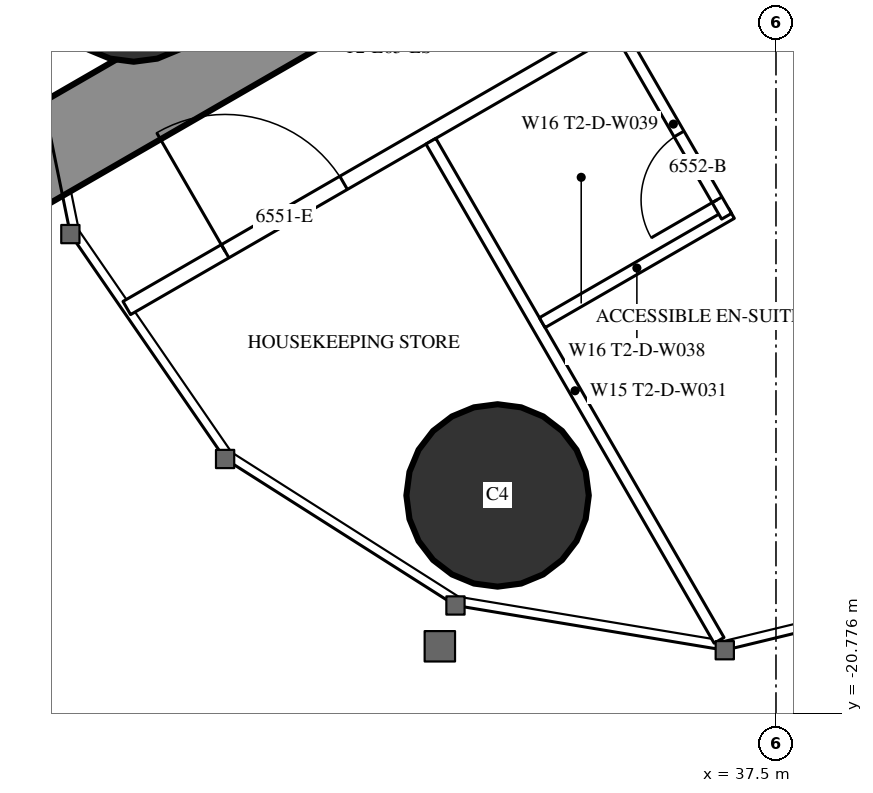
"""IFC4 building model, lengths in metres.
Left out: names, types, materials, properties, quantities, classifications, styles, units other than length and angle.
Written with IfcOpenShell. Run it as: python <this file> out.ifc"""

import sys

from ifc_helpers import new_model, si_unit, direction, frame, frame_2d, origin, origin_2d, place, context, subcontext, project, spatial, rectangle, circle, extrude, element, fill, save


model = new_model("IFC4")
c1 = context("Model", 3, precision=1e-05, world=origin(), true_north=direction((0.0, 1.0)))
c2 = subcontext(c1, "Body", "Model", "MODEL_VIEW")
j1 = project(units=[si_unit("LENGTHUNIT", "METRE"), si_unit("PLANEANGLEUNIT", "RADIAN")], contexts=[c1])
p1 = place(None, origin())
s1 = spatial("IfcSite", under=j1, at=p1, CompositionType="ELEMENT")
p2 = place(p1, origin())
s2 = spatial("IfcBuilding", under=s1, at=p2, CompositionType="ELEMENT")
p3 = place(p2, frame((0.0, 0.0, 244.1)))
s3 = spatial("IfcBuildingStorey", under=s2, at=p3, CompositionType="ELEMENT", Elevation=244.1)
for number, where, z_axis, x_axis in (
    (1, (33.837, -17.906, 0.0), (0.0, 0.0, 1.0), (1.0, 0.0, 0.0)),
    (2, (29.05, -11.0, 0.0), (0.0, 0.0, 1.0), (1.0, 0.0, 0.0)),
):
    element("IfcColumn", number, at=place(p3, frame(where, z_axis=z_axis, x_axis=x_axis)), inside=s3, PredefinedType="COLUMN", context=c2, shape_type="SweptSolid", body=[
        extrude(circle(Radius=1.2, at=origin_2d()), origin(), (0.0, 0.0, 1.0), 3.6),
    ])
p4 = place(p3, frame((27.2, -13.8, 0.0), z_axis=(0.0, 0.0, 1.0), x_axis=(0.866027159892, 0.499996958321, 0.0)))
e3 = element("IfcWall", 3, at=p4, inside=s3, PredefinedType="SHEAR", context=c2, shape_type="SweptSolid", body=[
    extrude(rectangle(XDim=27.947, YDim=1.2, at=frame_2d((13.973, 0.0))), origin(), (0.0, 0.0, 1.0), 3.6),
])
p5 = place(p4, frame((4.6, 0.0, 0.0)))
e4 = element("IfcOpeningElement", 4, at=p5, cuts=e3, PredefinedType="OPENING", context=c2, shape_type="SweptSolid", body=[
    extrude(rectangle(XDim=1.0, YDim=2.2, at=frame_2d((0.5, 1.1))), frame((0.0, 0.61, 0.0), z_axis=(0.0, -1.0, 0.0), x_axis=(1.0, 0.0, 0.0)), (0.0, 0.0, 1.0), 1.22),
])
p6 = place(p4, frame((13.395, 0.0, 0.0)))
e5 = element("IfcOpeningElement", 5, at=p6, cuts=e3, PredefinedType="OPENING", context=c2, shape_type="SweptSolid", body=[
    extrude(rectangle(XDim=1.8, YDim=2.2, at=frame_2d((0.9, 1.1))), frame((0.0, 0.61, 0.0), z_axis=(0.0, -1.0, 0.0), x_axis=(1.0, 0.0, 0.0)), (0.0, 0.0, 1.0), 1.22),
])
p7 = place(p3, frame((28.959, -15.44, 0.0), z_axis=(0.0, 0.0, 1.0), x_axis=(0.866025227435, 0.500000305447, 0.0)))
e6 = element("IfcWall", 6, at=p7, inside=s3, PredefinedType="PARTITIONING", context=c2, shape_type="SweptSolid", body=[
    extrude(rectangle(XDim=30.88, YDim=0.2, at=frame_2d((15.44, 0.0))), origin(), (0.0, 0.0, 1.0), 3.35),
])
p8 = place(p7, frame((1.494, 0.0, 0.0)))
e7 = element("IfcOpeningElement", 7, at=p8, cuts=e6, PredefinedType="OPENING", context=c2, shape_type="SweptSolid", body=[
    extrude(rectangle(XDim=1.8, YDim=2.04, at=frame_2d((0.9, 1.02))), frame((0.0, 0.11, 0.0), z_axis=(0.0, -1.0, 0.0), x_axis=(1.0, 0.0, 0.0)), (0.0, 0.0, 1.0), 0.22),
])
p9 = place(p7, frame((7.687, 0.0, 0.0)))
e8 = element("IfcOpeningElement", 8, at=p9, cuts=e6, PredefinedType="OPENING", context=c2, shape_type="SweptSolid", body=[
    extrude(rectangle(XDim=1.0, YDim=2.2, at=frame_2d((0.5, 1.1))), frame((0.0, 0.11, 0.0), z_axis=(0.0, -1.0, 0.0), x_axis=(1.0, 0.0, 0.0)), (0.0, 0.0, 1.0), 0.22),
])
p10 = place(p7, frame((18.321, 0.0, 0.0)))
e9 = element("IfcOpeningElement", 9, at=p10, cuts=e6, PredefinedType="OPENING", context=c2, shape_type="SweptSolid", body=[
    extrude(rectangle(XDim=0.95, YDim=2.2, at=frame_2d((0.475, 1.1))), frame((0.0, 0.11, 0.0), z_axis=(0.0, -1.0, 0.0), x_axis=(1.0, 0.0, 0.0)), (0.0, 0.0, 1.0), 0.22),
])
p11 = place(p7, frame((22.203, 0.0, 0.0)))
e10 = element("IfcOpeningElement", 10, at=p11, cuts=e6, PredefinedType="OPENING", context=c2, shape_type="SweptSolid", body=[
    extrude(rectangle(XDim=0.95, YDim=2.2, at=frame_2d((0.475, 1.1))), frame((0.0, 0.11, 0.0), z_axis=(0.0, -1.0, 0.0), x_axis=(1.0, 0.0, 0.0)), (0.0, 0.0, 1.0), 0.22),
])
p12 = place(p7, frame((26.192, 0.0, 0.0)))
e11 = element("IfcOpeningElement", 11, at=p12, cuts=e6, PredefinedType="OPENING", context=c2, shape_type="SweptSolid", body=[
    extrude(rectangle(XDim=1.8, YDim=2.2, at=frame_2d((0.9, 1.1))), frame((0.0, 0.11, 0.0), z_axis=(0.0, -1.0, 0.0), x_axis=(1.0, 0.0, 0.0)), (0.0, 0.0, 1.0), 0.22),
])
p13 = place(p3, frame((32.96, -13.246, 0.0), z_axis=(0.0, 0.0, 1.0), x_axis=(0.500000236886, -0.866025267018, 0.0)))
e12 = element("IfcWall", 12, at=p13, inside=s3, PredefinedType="PARTITIONING", context=c2, shape_type="SweptSolid", body=[
    extrude(rectangle(XDim=7.583, YDim=0.15, at=frame_2d((3.791, 0.0))), origin(), (0.0, 0.0, 1.0), 3.35),
])
p14 = place(p3, frame((34.425, -15.633, 0.0), z_axis=(0.0, 0.0, 1.0), x_axis=(0.866018712932, 0.500011588718, 0.0)))
e13 = element("IfcWall", 13, at=p14, inside=s3, PredefinedType="PARTITIONING", context=c2, shape_type="SweptSolid", body=[
    extrude(rectangle(XDim=2.875, YDim=0.15, at=frame_2d((1.438, 0.0))), origin(), (0.0, 0.0, 1.0), 3.35),
])
p15 = place(p3, frame((35.45, -11.808, 0.0), z_axis=(0.0, 0.0, 1.0), x_axis=(0.49994636267, -0.866056369097, 0.0)))
e14 = element("IfcWall", 14, at=p15, inside=s3, PredefinedType="PARTITIONING", context=c2, shape_type="SweptSolid", body=[
    extrude(rectangle(XDim=2.8, YDim=0.15, at=frame_2d((1.4, 0.0))), origin(), (0.0, 0.0, 1.0), 3.35),
])
p16 = place(p15, frame((1.55, 0.0, 0.0)))
e15 = element("IfcOpeningElement", 15, at=p16, cuts=e14, PredefinedType="OPENING", context=c2, shape_type="SweptSolid", body=[
    extrude(rectangle(XDim=1.0, YDim=2.2, at=frame_2d((0.5, 1.1))), frame((0.0, 0.085, 0.0), z_axis=(0.0, -1.0, 0.0), x_axis=(1.0, 0.0, 0.0)), (0.0, 0.0, 1.0), 0.17),
])
p17 = place(p8, origin())
e16 = element("IfcDoor", 16, at=p17, inside=s3, OperationType="DOUBLE_DOOR_SINGLE_SWING", PredefinedType="DOOR", context=c2, shape_type="SweptSolid", body=[
    extrude(rectangle(XDim=1.8, YDim=2.04, at=frame_2d((0.9, 1.02))), frame((0.0, 0.025, 0.0), z_axis=(0.0, -1.0, 0.0), x_axis=(1.0, 0.0, 0.0)), (0.0, 0.0, 1.0), 0.05),
])
fill(e7, e16)
p18 = place(p16, origin())
e17 = element("IfcDoor", 17, at=p18, inside=s3, OperationType="SINGLE_SWING_RIGHT", PredefinedType="DOOR", context=c2, shape_type="SweptSolid", body=[
    extrude(rectangle(XDim=1.0, YDim=2.2, at=frame_2d((0.5, 1.1))), frame((0.0, 0.025, 0.0), z_axis=(0.0, -1.0, 0.0), x_axis=(1.0, 0.0, 0.0)), (0.0, 0.0, 1.0), 0.05),
])
fill(e15, e17)
save(model, sys.argv[1])
